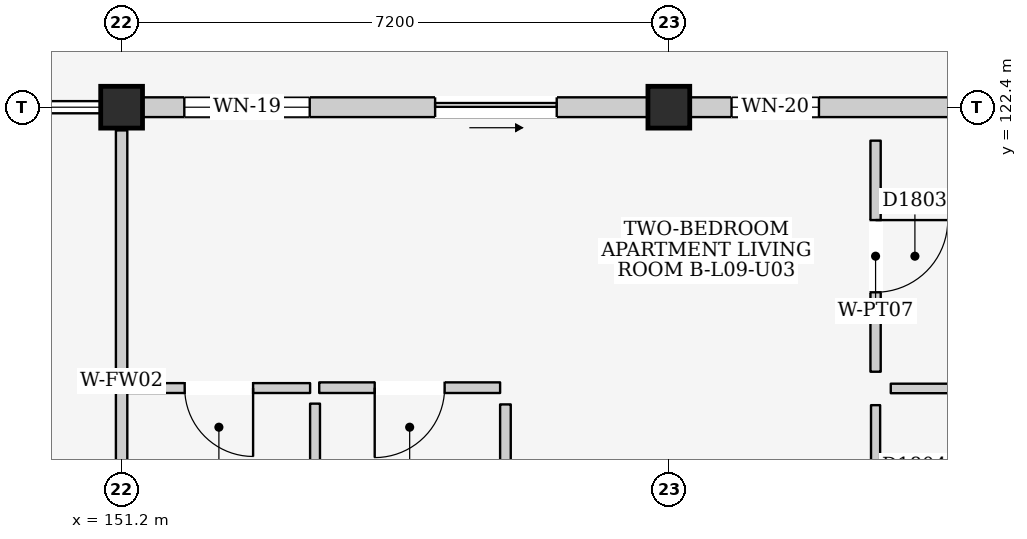
"""IFC4 building model, lengths in metres.
Left out: names, types, materials, properties, quantities, classifications, styles, units other than length and angle.
Written with IfcOpenShell. Run it as: python <this file> out.ifc"""

import sys

from ifc_helpers import new_model, si_unit, direction, frame, frame_2d, origin, origin_2d, place, context, subcontext, project, spatial, rectangle, extrude, element, fill, save


model = new_model("IFC4")
c1 = context("Model", 3, precision=1e-05, world=origin(), true_north=direction((0.0, 1.0)))
c2 = subcontext(c1, "Body", "Model", "MODEL_VIEW")
j1 = project(units=[si_unit("LENGTHUNIT", "METRE"), si_unit("PLANEANGLEUNIT", "RADIAN")], contexts=[c1])
p1 = place(None, origin())
s1 = spatial("IfcSite", under=j1, at=p1, CompositionType="ELEMENT")
p2 = place(p1, origin())
s2 = spatial("IfcBuilding", under=s1, at=p2, CompositionType="ELEMENT")
p3 = place(p2, frame((0.0, 0.0, 31.5)))
s3 = spatial("IfcBuildingStorey", under=s2, at=p3, CompositionType="ELEMENT", Elevation=31.5)
for number, where, z_axis, x_axis in (
    (1, (151.2, 122.4, 0.0), (0.0, 0.0, 1.0), (1.0, 0.0, 0.0)),
    (2, (158.4, 122.4, 0.0), (0.0, 0.0, 1.0), (1.0, 0.0, 0.0)),
):
    element("IfcColumn", number, at=place(p3, frame(where, z_axis=z_axis, x_axis=x_axis)), inside=s3, PredefinedType="COLUMN", context=c2, shape_type="SweptSolid", body=[
        extrude(rectangle(XDim=0.55, YDim=0.55, at=origin_2d()), origin(), (0.0, 0.0, 1.0), 3.3),
    ])
p4 = place(p3, frame((151.475, 122.4, 0.0), z_axis=(0.0, 0.0, 1.0), x_axis=(1.0, 0.0, 0.0)))
e3 = element("IfcWall", 3, at=p4, inside=s3, PredefinedType="ELEMENTEDWALL", context=c2, shape_type="SweptSolid", body=[
    extrude(rectangle(XDim=6.65, YDim=0.26, at=frame_2d((3.325, 0.0))), origin(), (0.0, 0.0, 1.0), 2.615),
])
p5 = place(p4, frame((3.85, 0.0, 0.0)))
e4 = element("IfcOpeningElement", 4, at=p5, cuts=e3, PredefinedType="OPENING", context=c2, shape_type="SweptSolid", body=[
    extrude(rectangle(XDim=1.6, YDim=2.12, at=frame_2d((0.8, 1.06))), frame((0.0, 0.145, 0.0), z_axis=(0.0, -1.0, 0.0), x_axis=(1.0, 0.0, 0.0)), (0.0, 0.0, 1.0), 0.29),
])
p6 = place(p4, frame((0.55, 0.0, 0.9)))
e5 = element("IfcOpeningElement", 5, at=p6, cuts=e3, PredefinedType="OPENING", context=c2, shape_type="SweptSolid", body=[
    extrude(rectangle(XDim=1.65, YDim=1.35, at=frame_2d((0.825, 0.675))), frame((0.0, 0.145, 0.0), z_axis=(0.0, -1.0, 0.0), x_axis=(1.0, 0.0, 0.0)), (0.0, 0.0, 1.0), 0.29),
])
p7 = place(p3, frame((158.675, 122.4, 0.0), z_axis=(0.0, 0.0, 1.0), x_axis=(1.0, 0.0, 0.0)))
e6 = element("IfcWall", 6, at=p7, inside=s3, PredefinedType="ELEMENTEDWALL", context=c2, shape_type="SweptSolid", body=[
    extrude(rectangle(XDim=6.65, YDim=0.26, at=frame_2d((3.325, 0.0))), origin(), (0.0, 0.0, 1.0), 2.615),
])
p8 = place(p7, frame((3.85, 0.0, 0.0)))
e7 = element("IfcOpeningElement", 7, at=p8, cuts=e6, PredefinedType="OPENING", context=c2, shape_type="SweptSolid", body=[
    extrude(rectangle(XDim=1.5, YDim=2.12, at=frame_2d((0.75, 1.06))), frame((0.0, 0.145, 0.0), z_axis=(0.0, -1.0, 0.0), x_axis=(1.0, 0.0, 0.0)), (0.0, 0.0, 1.0), 0.29),
])
p9 = place(p7, frame((0.55, 0.0, 0.9)))
e8 = element("IfcOpeningElement", 8, at=p9, cuts=e6, PredefinedType="OPENING", context=c2, shape_type="SweptSolid", body=[
    extrude(rectangle(XDim=1.15, YDim=1.15, at=frame_2d((0.575, 0.575))), frame((0.0, 0.145, 0.0), z_axis=(0.0, -1.0, 0.0), x_axis=(1.0, 0.0, 0.0)), (0.0, 0.0, 1.0), 0.29),
])
p10 = place(p3, frame((151.2, 115.505, 0.0), z_axis=(0.0, 0.0, 1.0), x_axis=(0.0, 1.0, 0.0)))
e9 = element("IfcWall", 9, at=p10, inside=s3, PredefinedType="PARTITIONING", context=c2, shape_type="SweptSolid", body=[
    extrude(rectangle(XDim=6.59, YDim=0.15, at=frame_2d((3.295, 0.0))), origin(), (0.0, 0.0, 1.0), 2.565),
])
p11 = place(p3, frame((151.28, 118.705, 0.0), z_axis=(0.0, 0.0, 1.0), x_axis=(1.0, 0.0, 0.0)))
e10 = element("IfcWall", 10, at=p11, inside=s3, PredefinedType="PARTITIONING", context=c2, shape_type="SweptSolid", body=[
    extrude(rectangle(XDim=2.4, YDim=0.13, at=frame_2d((1.2, 0.0))), origin(), (0.0, 0.0, 1.0), 3.08),
])
p12 = place(p11, frame((0.75, 0.0, 0.0)))
e11 = element("IfcOpeningElement", 11, at=p12, cuts=e10, PredefinedType="OPENING", context=c2, shape_type="SweptSolid", body=[
    extrude(rectangle(XDim=0.9, YDim=2.1, at=frame_2d((0.45, 1.05))), frame((0.0, 0.08, 0.0), z_axis=(0.0, -1.0, 0.0), x_axis=(1.0, 0.0, 0.0)), (0.0, 0.0, 1.0), 0.16),
])
p13 = place(p3, frame((153.745, 115.46, 0.0), z_axis=(0.0, 0.0, 1.0), x_axis=(0.0, 1.0, 0.0)))
e12 = element("IfcWall", 12, at=p13, inside=s3, PredefinedType="PARTITIONING", context=c2, shape_type="SweptSolid", body=[
    extrude(rectangle(XDim=3.04, YDim=0.13, at=frame_2d((1.52, 0.0))), origin(), (0.0, 0.0, 1.0), 3.08),
])
p14 = place(p3, frame((153.8, 118.71, 0.0), z_axis=(0.0, 0.0, 1.0), x_axis=(1.0, 0.0, 0.0)))
e13 = element("IfcWall", 13, at=p14, inside=s3, PredefinedType="PARTITIONING", context=c2, shape_type="SweptSolid", body=[
    extrude(rectangle(XDim=2.38, YDim=0.14, at=frame_2d((1.19, 0.0))), origin(), (0.0, 0.0, 1.0), 3.08),
])
p15 = place(p14, frame((0.73, 0.0, 0.0)))
e14 = element("IfcOpeningElement", 14, at=p15, cuts=e13, PredefinedType="OPENING", context=c2, shape_type="SweptSolid", body=[
    extrude(rectangle(XDim=0.92, YDim=2.1, at=frame_2d((0.46, 1.05))), frame((0.0, 0.085, 0.0), z_axis=(0.0, -1.0, 0.0), x_axis=(1.0, 0.0, 0.0)), (0.0, 0.0, 1.0), 0.17),
])
p16 = place(p3, frame((156.25, 115.43, 0.0), z_axis=(0.0, 0.0, 1.0), x_axis=(0.0, 1.0, 0.0)))
e15 = element("IfcWall", 15, at=p16, inside=s3, PredefinedType="PARTITIONING", context=c2, shape_type="SweptSolid", body=[
    extrude(rectangle(XDim=3.06, YDim=0.14, at=frame_2d((1.53, 0.0))), origin(), (0.0, 0.0, 1.0), 3.08),
])
p17 = place(p3, frame((161.12, 118.92, 0.0), z_axis=(0.0, 0.0, 1.0), x_axis=(0.0, 1.0, 0.0)))
e16 = element("IfcWall", 16, at=p17, inside=s3, PredefinedType="PARTITIONING", context=c2, shape_type="SweptSolid", body=[
    extrude(rectangle(XDim=3.04, YDim=0.135, at=frame_2d((1.52, 0.0))), origin(), (0.0, 0.0, 1.0), 3.08),
])
p18 = place(p17, frame((1.045, 0.0, 0.0)))
e17 = element("IfcOpeningElement", 17, at=p18, cuts=e16, PredefinedType="OPENING", context=c2, shape_type="SweptSolid", body=[
    extrude(rectangle(XDim=0.95, YDim=2.15, at=frame_2d((0.475, 1.075))), frame((0.0, 0.083, 0.0), z_axis=(0.0, -1.0, 0.0), x_axis=(1.0, 0.0, 0.0)), (0.0, 0.0, 1.0), 0.165),
])
p19 = place(p3, frame((161.32, 118.7, 0.0), z_axis=(0.0, 0.0, 1.0), x_axis=(1.0, 0.0, 0.0)))
e18 = element("IfcWall", 18, at=p19, inside=s3, PredefinedType="PARTITIONING", context=c2, shape_type="SweptSolid", body=[
    extrude(rectangle(XDim=4.06, YDim=0.125, at=frame_2d((2.03, 0.0))), origin(), (0.0, 0.0, 1.0), 3.08),
])
p20 = place(p3, frame((161.12, 115.44, 0.0), z_axis=(0.0, 0.0, 1.0), x_axis=(0.0, 1.0, 0.0)))
e19 = element("IfcWall", 19, at=p20, inside=s3, PredefinedType="PARTITIONING", context=c2, shape_type="SweptSolid", body=[
    extrude(rectangle(XDim=3.04, YDim=0.12, at=frame_2d((1.52, 0.0))), origin(), (0.0, 0.0, 1.0), 3.08),
])
p21 = place(p20, frame((1.04, 0.0, 0.0)))
e20 = element("IfcOpeningElement", 20, at=p21, cuts=e19, PredefinedType="OPENING", context=c2, shape_type="SweptSolid", body=[
    extrude(rectangle(XDim=0.96, YDim=2.15, at=frame_2d((0.48, 1.075))), frame((0.0, 0.075, 0.0), z_axis=(0.0, -1.0, 0.0), x_axis=(1.0, 0.0, 0.0)), (0.0, 0.0, 1.0), 0.15),
])
p22 = place(p5, frame((1.6, 0.0, 0.0), z_axis=(0.0, 0.0, 1.0), x_axis=(-1.0, 0.0, 0.0)))
e21 = element("IfcDoor", 21, at=p22, inside=s3, OperationType="SLIDING_TO_RIGHT", PredefinedType="DOOR", context=c2, shape_type="SweptSolid", body=[
    extrude(rectangle(XDim=1.6, YDim=2.12, at=frame_2d((0.8, 1.06))), frame((0.0, 0.025, 0.0), z_axis=(0.0, -1.0, 0.0), x_axis=(1.0, 0.0, 0.0)), (0.0, 0.0, 1.0), 0.05),
])
fill(e4, e21)
p23 = place(p6, origin())
e22 = element("IfcWindow", 22, at=p23, inside=s3, PartitioningType="DOUBLE_PANEL_VERTICAL", PredefinedType="WINDOW", context=c2, shape_type="SweptSolid", body=[
    extrude(rectangle(XDim=1.65, YDim=1.35, at=frame_2d((0.825, 0.675))), frame((0.0, 0.03, 0.0), z_axis=(0.0, -1.0, 0.0), x_axis=(1.0, 0.0, 0.0)), (0.0, 0.0, 1.0), 0.06),
])
fill(e5, e22)
p24 = place(p9, origin())
e23 = element("IfcWindow", 23, at=p24, inside=s3, PartitioningType="SINGLE_PANEL", PredefinedType="WINDOW", context=c2, shape_type="SweptSolid", body=[
    extrude(rectangle(XDim=1.15, YDim=1.15, at=frame_2d((0.575, 0.575))), frame((0.0, 0.03, 0.0), z_axis=(0.0, -1.0, 0.0), x_axis=(1.0, 0.0, 0.0)), (0.0, 0.0, 1.0), 0.06),
])
fill(e8, e23)
p25 = place(p12, frame((0.9, 0.0, 0.0), z_axis=(0.0, 0.0, 1.0), x_axis=(-1.0, 0.0, 0.0)))
e24 = element("IfcDoor", 24, at=p25, inside=s3, OperationType="SINGLE_SWING_LEFT", PredefinedType="DOOR", context=c2, shape_type="SweptSolid", body=[
    extrude(rectangle(XDim=0.9, YDim=2.1, at=frame_2d((0.45, 1.05))), frame((0.0, 0.025, 0.0), z_axis=(0.0, -1.0, 0.0), x_axis=(1.0, 0.0, 0.0)), (0.0, 0.0, 1.0), 0.05),
])
fill(e11, e24)
p26 = place(p15, frame((0.92, 0.0, 0.0), z_axis=(0.0, 0.0, 1.0), x_axis=(-1.0, 0.0, 0.0)))
e25 = element("IfcDoor", 25, at=p26, inside=s3, OperationType="SINGLE_SWING_RIGHT", PredefinedType="DOOR", context=c2, shape_type="SweptSolid", body=[
    extrude(rectangle(XDim=0.92, YDim=2.1, at=frame_2d((0.46, 1.05))), frame((0.0, 0.025, 0.0), z_axis=(0.0, -1.0, 0.0), x_axis=(1.0, 0.0, 0.0)), (0.0, 0.0, 1.0), 0.05),
])
fill(e14, e25)
p27 = place(p18, frame((0.95, 0.0, 0.0), z_axis=(0.0, 0.0, 1.0), x_axis=(-1.0, 0.0, 0.0)))
e26 = element("IfcDoor", 26, at=p27, inside=s3, OperationType="SINGLE_SWING_LEFT", PredefinedType="DOOR", context=c2, shape_type="SweptSolid", body=[
    extrude(rectangle(XDim=0.95, YDim=2.15, at=frame_2d((0.475, 1.075))), frame((0.0, 0.025, 0.0), z_axis=(0.0, -1.0, 0.0), x_axis=(1.0, 0.0, 0.0)), (0.0, 0.0, 1.0), 0.05),
])
fill(e17, e26)
save(model, sys.argv[1])
